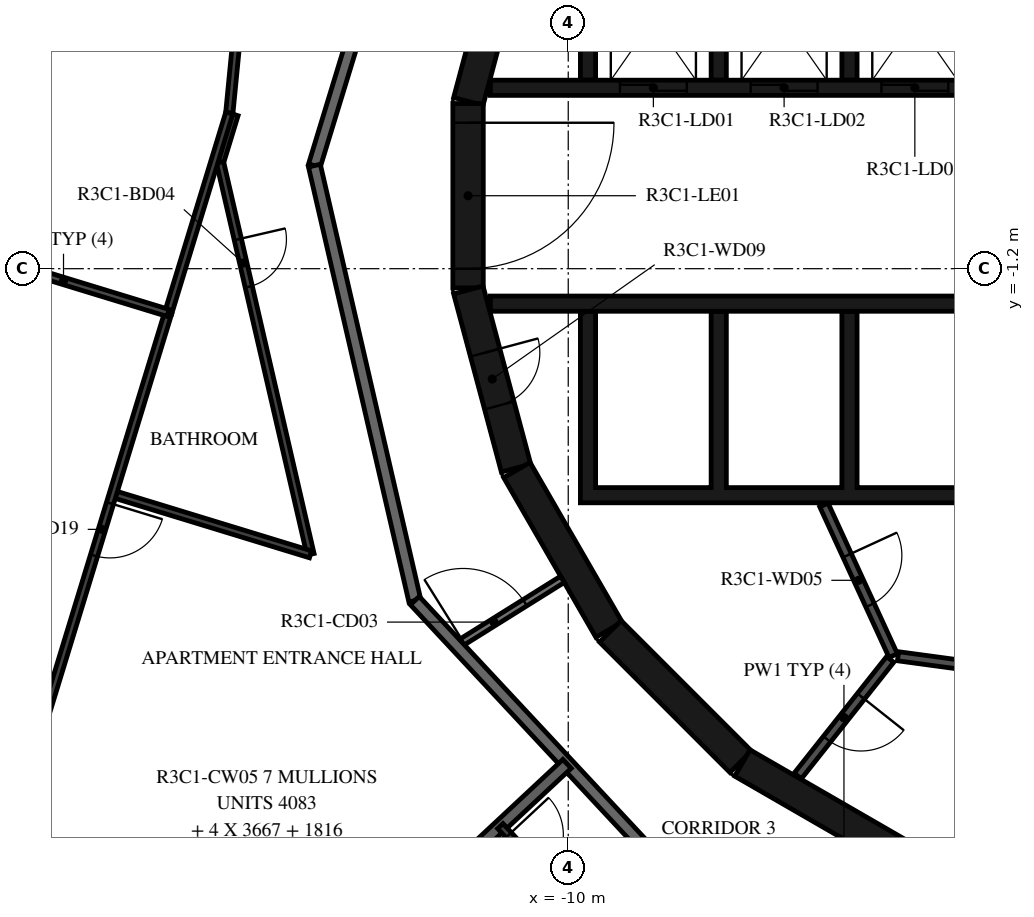
"""IFC4 building model, lengths in metres.
Left out: names, types, materials, properties, quantities, classifications, styles, units other than length and angle.
Written with IfcOpenShell. Run it as: python <this file> out.ifc"""

import sys

from ifc_helpers import new_model, si_unit, direction, frame, frame_2d, origin, place, context, subcontext, project, spatial, polyline, rectangle, outline, extrude, element, fill, save


model = new_model("IFC4")
c1 = context("Model", 3, precision=1e-05, world=origin(), true_north=direction((0.0, 1.0)))
c2 = subcontext(c1, "Body", "Model", "MODEL_VIEW")
j1 = project(units=[si_unit("LENGTHUNIT", "METRE"), si_unit("PLANEANGLEUNIT", "RADIAN")], contexts=[c1])
p1 = place(None, origin())
s1 = spatial("IfcSite", under=j1, at=p1, CompositionType="ELEMENT")
p2 = place(p1, origin())
s2 = spatial("IfcBuilding", under=s1, at=p2, CompositionType="ELEMENT")
p3 = place(p2, frame((0.0, 0.0, 137.9)))
s3 = spatial("IfcBuildingStorey", under=s2, at=p3, CompositionType="ELEMENT", Elevation=137.9)
p4 = place(p3, frame((-10.858, 4.479, 0.0), z_axis=(0.0, 0.0, 1.0), x_axis=(-0.258734743916, -0.965948410781, 0.0)))
e1 = element("IfcWall", 1, at=p4, inside=s3, PredefinedType="SHEAR", context=c2, shape_type="SweptSolid", body=[
    extrude(rectangle(XDim=3.033, YDim=0.5, at=frame_2d((1.516, 0.0))), origin(), (0.0, 0.0, 1.0), 3.12),
])
p5 = place(p3, frame((-11.647, 1.516, 0.0), z_axis=(0.0, 0.0, 1.0), x_axis=(0.0, -1.0, 0.0)))
e2 = element("IfcWall", 2, at=p5, inside=s3, PredefinedType="SHEAR", context=c2, shape_type="SweptSolid", body=[
    extrude(rectangle(XDim=3.033, YDim=0.5, at=frame_2d((1.516, 0.0))), origin(), (0.0, 0.0, 1.0), 3.12),
])
p6 = place(p5, frame((0.316, 0.0, 0.0)))
e3 = element("IfcOpeningElement", 3, at=p6, cuts=e2, PredefinedType="OPENING", context=c2, shape_type="SweptSolid", body=[
    extrude(rectangle(XDim=2.4, YDim=2.1, at=frame_2d((1.2, 1.05))), frame((0.0, 0.26, 0.0), z_axis=(0.0, -1.0, 0.0), x_axis=(1.0, 0.0, 0.0)), (0.0, 0.0, 1.0), 0.52),
])
p7 = place(p3, frame((-11.643, -1.55, 0.0), z_axis=(0.0, 0.0, 1.0), x_axis=(0.258734743916, -0.965948410781, 0.0)))
e4 = element("IfcWall", 4, at=p7, inside=s3, PredefinedType="SHEAR", context=c2, shape_type="SweptSolid", body=[
    extrude(rectangle(XDim=3.033, YDim=0.5, at=frame_2d((1.516, 0.0))), origin(), (0.0, 0.0, 1.0), 3.12),
])
p8 = place(p7, frame((1.066, 0.0, 0.0)))
e5 = element("IfcOpeningElement", 5, at=p8, cuts=e4, PredefinedType="OPENING", context=c2, shape_type="SweptSolid", body=[
    extrude(rectangle(XDim=0.9, YDim=2.1, at=frame_2d((0.45, 1.05))), frame((0.0, 0.26, 0.0), z_axis=(0.0, -1.0, 0.0), x_axis=(1.0, 0.0, 0.0)), (0.0, 0.0, 1.0), 0.52),
])
p9 = place(p3, frame((-10.845, -4.51, 0.0), z_axis=(0.0, 0.0, 1.0), x_axis=(0.500087131594, -0.865975092491, 0.0)))
e6 = element("IfcWall", 6, at=p9, inside=s3, PredefinedType="SHEAR", context=c2, shape_type="SweptSolid", body=[
    extrude(rectangle(XDim=3.033, YDim=0.5, at=frame_2d((1.516, 0.0))), origin(), (0.0, 0.0, 1.0), 3.12),
])
p10 = place(p3, frame((-9.308, -7.164, 0.0), z_axis=(0.0, 0.0, 1.0), x_axis=(0.707106781187, -0.707106781187, 0.0)))
e7 = element("IfcWall", 7, at=p10, inside=s3, PredefinedType="SHEAR", context=c2, shape_type="SweptSolid", body=[
    extrude(rectangle(XDim=3.032, YDim=0.5, at=frame_2d((1.516, 0.0))), origin(), (0.0, 0.0, 1.0), 3.12),
])
p11 = place(p3, frame((-7.137, -9.329, 0.0), z_axis=(0.0, 0.0, 1.0), x_axis=(0.865975092491, -0.500087131594, 0.0)))
e8 = element("IfcWall", 8, at=p11, inside=s3, PredefinedType="SHEAR", context=c2, shape_type="SweptSolid", body=[
    extrude(rectangle(XDim=3.033, YDim=0.5, at=frame_2d((1.516, 0.0))), origin(), (0.0, 0.0, 1.0), 3.12),
])
p12 = place(p3, origin())
e9 = element("IfcWall", 9, at=p12, inside=s3, PredefinedType="SHEAR", context=c2, shape_type="SweptSolid", body=[
    extrude(outline(polyline([(-9.55, 4.8), (-7.65, 4.8), (-7.65, 1.9), (-7.4, 1.9), (-7.4, 4.8), (-5.5, 4.8), (-5.5, 1.9), (-5.25, 1.9), (-5.25, 4.8), (-3.35, 4.8), (-3.35, 1.9), (-3.1, 1.9), (-3.1, 4.8), (-1.2, 4.8), (-1.2, 1.9), (-0.95, 1.9), (-0.95, 4.8), (0.95, 4.8), (0.95, 1.9), (1.2, 1.9), (1.2, 4.8), (3.1, 4.8), (3.1, 1.9), (3.35, 1.9), (3.35, 4.8), (5.25, 4.8), (5.25, 1.9), (5.5, 1.9), (5.5, 4.8), (7.4, 4.8), (7.4, 1.9), (7.65, 1.9), (7.65, 4.8), (9.55, 4.8), (9.55, 1.9), (9.8, 1.9), (9.8, 4.8), (9.8, 5.05), (-9.8, 5.05), (-9.8, 4.8), (-9.8, 1.9), (-9.55, 1.9), (-9.55, 4.8)])), origin(), (0.0, 0.0, 1.0), 3.12),
])
p13 = place(p3, origin())
e10 = element("IfcWall", 10, at=p13, inside=s3, PredefinedType="SHEAR", context=c2, shape_type="SweptSolid", body=[
    extrude(outline(polyline([(9.8, -5.05), (9.8, -4.8), (9.8, -1.9), (9.55, -1.9), (9.55, -4.8), (7.65, -4.8), (7.65, -1.9), (7.4, -1.9), (7.4, -4.8), (5.5, -4.8), (5.5, -1.9), (5.25, -1.9), (5.25, -4.8), (3.35, -4.8), (3.35, -1.9), (3.1, -1.9), (3.1, -4.8), (-5.25, -4.8), (-5.25, -1.9), (-5.5, -1.9), (-5.5, -4.8), (-7.4, -4.8), (-7.4, -1.9), (-7.65, -1.9), (-7.65, -4.8), (-9.55, -4.8), (-9.55, -1.9), (-9.8, -1.9), (-9.8, -4.8), (-9.8, -5.05), (9.8, -5.05)])), origin(), (0.0, 0.0, 1.0), 3.12),
])
p14 = place(p3, frame((-11.28, 1.775, 0.0), z_axis=(0.0, 0.0, 1.0), x_axis=(1.0, 0.0, 0.0)))
e11 = element("IfcWall", 11, at=p14, inside=s3, PredefinedType="SHEAR", context=c2, shape_type="SweptSolid", body=[
    extrude(rectangle(XDim=14.38, YDim=0.25, at=frame_2d((7.19, 0.0))), origin(), (0.0, 0.0, 1.0), 3.12),
])
p15 = place(p14, frame((2.13, 0.0, 0.0)))
e12 = element("IfcOpeningElement", 12, at=p15, cuts=e11, PredefinedType="OPENING", context=c2, shape_type="SweptSolid", body=[
    extrude(rectangle(XDim=1.1, YDim=2.1, at=frame_2d((0.55, 1.05))), frame((0.0, 0.135, 0.0), z_axis=(0.0, -1.0, 0.0), x_axis=(1.0, 0.0, 0.0)), (0.0, 0.0, 1.0), 0.27),
])
p16 = place(p14, frame((4.28, 0.0, 0.0)))
e13 = element("IfcOpeningElement", 13, at=p16, cuts=e11, PredefinedType="OPENING", context=c2, shape_type="SweptSolid", body=[
    extrude(rectangle(XDim=1.1, YDim=2.1, at=frame_2d((0.55, 1.05))), frame((0.0, 0.135, 0.0), z_axis=(0.0, -1.0, 0.0), x_axis=(1.0, 0.0, 0.0)), (0.0, 0.0, 1.0), 0.27),
])
p17 = place(p14, frame((6.43, 0.0, 0.0)))
e14 = element("IfcOpeningElement", 14, at=p17, cuts=e11, PredefinedType="OPENING", context=c2, shape_type="SweptSolid", body=[
    extrude(rectangle(XDim=1.1, YDim=2.1, at=frame_2d((0.55, 1.05))), frame((0.0, 0.135, 0.0), z_axis=(0.0, -1.0, 0.0), x_axis=(1.0, 0.0, 0.0)), (0.0, 0.0, 1.0), 0.27),
])
p18 = place(p14, frame((8.58, 0.0, 0.0)))
e15 = element("IfcOpeningElement", 15, at=p18, cuts=e11, PredefinedType="OPENING", context=c2, shape_type="SweptSolid", body=[
    extrude(rectangle(XDim=1.1, YDim=2.1, at=frame_2d((0.55, 1.05))), frame((0.0, 0.135, 0.0), z_axis=(0.0, -1.0, 0.0), x_axis=(1.0, 0.0, 0.0)), (0.0, 0.0, 1.0), 0.27),
])
p19 = place(p14, frame((10.83, 0.0, 0.0)))
e16 = element("IfcOpeningElement", 16, at=p19, cuts=e11, PredefinedType="OPENING", context=c2, shape_type="SweptSolid", body=[
    extrude(rectangle(XDim=0.9, YDim=2.1, at=frame_2d((0.45, 1.05))), frame((0.0, 0.135, 0.0), z_axis=(0.0, -1.0, 0.0), x_axis=(1.0, 0.0, 0.0)), (0.0, 0.0, 1.0), 0.27),
])
p20 = place(p14, frame((12.98, 0.0, 0.0)))
e17 = element("IfcOpeningElement", 17, at=p20, cuts=e11, PredefinedType="OPENING", context=c2, shape_type="SweptSolid", body=[
    extrude(rectangle(XDim=0.9, YDim=2.1, at=frame_2d((0.45, 1.05))), frame((0.0, 0.135, 0.0), z_axis=(0.0, -1.0, 0.0), x_axis=(1.0, 0.0, 0.0)), (0.0, 0.0, 1.0), 0.27),
])
p21 = place(p3, frame((-11.28, -1.775, 0.0), z_axis=(0.0, 0.0, 1.0), x_axis=(1.0, 0.0, 0.0)))
e18 = element("IfcWall", 18, at=p21, inside=s3, PredefinedType="SHEAR", context=c2, shape_type="SweptSolid", body=[
    extrude(rectangle(XDim=14.38, YDim=0.25, at=frame_2d((7.19, 0.0))), origin(), (0.0, 0.0, 1.0), 3.12),
])
p22 = place(p21, frame((9.755, 0.0, 0.0)))
e19 = element("IfcOpeningElement", 19, at=p22, cuts=e18, PredefinedType="OPENING", context=c2, shape_type="SweptSolid", body=[
    extrude(rectangle(XDim=0.9, YDim=2.1, at=frame_2d((0.45, 1.05))), frame((0.0, 0.135, 0.0), z_axis=(0.0, -1.0, 0.0), x_axis=(1.0, 0.0, 0.0)), (0.0, 0.0, 1.0), 0.27),
])
p23 = place(p3, frame((-5.795, -5.086, 0.0), z_axis=(0.0, 0.0, 1.0), x_axis=(0.417887867606, -0.908498613157, 0.0)))
e20 = element("IfcWall", 20, at=p23, inside=s3, PredefinedType="PARTITIONING", context=c2, shape_type="SweptSolid", body=[
    extrude(rectangle(XDim=2.726, YDim=0.15, at=frame_2d((1.363, 0.0))), origin(), (0.0, 0.0, 1.0), 3.12),
])
p24 = place(p23, frame((0.913, 0.0, 0.0)))
e21 = element("IfcOpeningElement", 21, at=p24, cuts=e20, PredefinedType="OPENING", context=c2, shape_type="SweptSolid", body=[
    extrude(rectangle(XDim=0.9, YDim=2.1, at=frame_2d((0.45, 1.05))), frame((0.0, 0.085, 0.0), z_axis=(0.0, -1.0, 0.0), x_axis=(1.0, 0.0, 0.0)), (0.0, 0.0, 1.0), 0.17),
])
p25 = place(p3, frame((-4.706, -7.625, 0.0), z_axis=(0.0, 0.0, 1.0), x_axis=(-0.621392599334, -0.783499353856, 0.0)))
e22 = element("IfcWall", 22, at=p25, inside=s3, PredefinedType="PARTITIONING", context=c2, shape_type="SweptSolid", body=[
    extrude(rectangle(XDim=2.447, YDim=0.15, at=frame_2d((1.224, 0.0))), origin(), (0.0, 0.0, 1.0), 3.12),
])
p26 = place(p25, frame((0.774, 0.0, 0.0)))
e23 = element("IfcOpeningElement", 23, at=p26, cuts=e22, PredefinedType="OPENING", context=c2, shape_type="SweptSolid", body=[
    extrude(rectangle(XDim=0.9, YDim=2.1, at=frame_2d((0.45, 1.05))), frame((0.0, 0.085, 0.0), z_axis=(0.0, -1.0, 0.0), x_axis=(1.0, 0.0, 0.0)), (0.0, 0.0, 1.0), 0.17),
])
p27 = place(p3, frame((-2.42, -7.865, 0.0), z_axis=(0.0, 0.0, 1.0), x_axis=(-0.990972299108, 0.134066783362, 0.0)))
e24 = element("IfcWall", 24, at=p27, inside=s3, PredefinedType="PARTITIONING", context=c2, shape_type="SweptSolid", body=[
    extrude(rectangle(XDim=2.176, YDim=0.15, at=frame_2d((1.088, 0.0))), origin(), (0.0, 0.0, 1.0), 3.12),
])
p28 = place(p3, frame((-11.836, -7.396, 0.0), z_axis=(0.0, 0.0, 1.0), x_axis=(0.848071831599, 0.529881277692, 0.0)))
e25 = element("IfcWall", 25, at=p28, inside=s3, PredefinedType="PARTITIONING", context=c2, shape_type="SweptSolid", body=[
    extrude(rectangle(XDim=2.052, YDim=0.12, at=frame_2d((1.026, 0.0))), origin(), (0.0, 0.0, 1.0), 3.12),
])
p29 = place(p28, frame((0.125, 0.0, 0.0)))
e26 = element("IfcOpeningElement", 26, at=p29, cuts=e25, PredefinedType="OPENING", context=c2, shape_type="SweptSolid", body=[
    extrude(rectangle(XDim=1.2, YDim=2.1, at=frame_2d((0.6, 1.05))), frame((0.0, 0.07, 0.0), z_axis=(0.0, -1.0, 0.0), x_axis=(1.0, 0.0, 0.0)), (0.0, 0.0, 1.0), 0.14),
])
p30 = place(p3, frame((-12.028, 7.516, 0.0), z_axis=(0.0, 0.0, 1.0), x_axis=(-0.292365533182, -0.956306642771, 0.0)))
e27 = element("IfcWall", 27, at=p30, inside=s3, PredefinedType="STANDARD", context=c2, shape_type="SweptSolid", body=[
    extrude(rectangle(XDim=7.342, YDim=0.2, at=frame_2d((3.671, 0.0))), origin(), (0.0, 0.0, 1.0), 3.12),
])
p31 = place(p30, frame((2.533, 0.0, 0.0)))
e28 = element("IfcOpeningElement", 28, at=p31, cuts=e27, PredefinedType="OPENING", context=c2, shape_type="SweptSolid", body=[
    extrude(rectangle(XDim=1.0, YDim=2.1, at=frame_2d((0.5, 1.05))), frame((0.0, 0.11, 0.0), z_axis=(0.0, -1.0, 0.0), x_axis=(1.0, 0.0, 0.0)), (0.0, 0.0, 1.0), 0.22),
])
p32 = place(p3, frame((-14.175, 0.495, 0.0), z_axis=(0.0, 0.0, 1.0), x_axis=(0.224922649383, -0.974376622151, 0.0)))
e29 = element("IfcWall", 29, at=p32, inside=s3, PredefinedType="STANDARD", context=c2, shape_type="SweptSolid", body=[
    extrude(rectangle(XDim=7.342, YDim=0.2, at=frame_2d((3.671, 0.0))), origin(), (0.0, 0.0, 1.0), 3.12),
])
p33 = place(p3, frame((-12.523, -6.659, 0.0), z_axis=(0.0, 0.0, 1.0), x_axis=(0.682001841105, -0.731350455479, 0.0)))
e30 = element("IfcWall", 30, at=p33, inside=s3, PredefinedType="STANDARD", context=c2, shape_type="SweptSolid", body=[
    extrude(rectangle(XDim=7.342, YDim=0.2, at=frame_2d((3.671, 0.0))), origin(), (0.0, 0.0, 1.0), 3.12),
])
p34 = place(p3, frame((-13.699, -12.774, 0.0), z_axis=(0.0, 0.0, 1.0), x_axis=(0.731353758457, 0.681998299111, 0.0)))
e31 = element("IfcWall", 31, at=p34, inside=s3, PredefinedType="STANDARD", context=c2, shape_type="SweptSolid", body=[
    extrude(rectangle(XDim=5.031, YDim=0.2, at=frame_2d((2.515, 0.0))), origin(), (0.0, 0.0, 1.0), 3.12),
])
p35 = place(p3, frame((-15.138, 5.828, 0.0), z_axis=(0.0, 0.0, 1.0), x_axis=(-0.096967255409, -0.995287572201, 0.0)))
e32 = element("IfcWall", 32, at=p35, inside=s3, PredefinedType="PARTITIONING", context=c2, shape_type="SweptSolid", body=[
    extrude(rectangle(XDim=4.489, YDim=0.12, at=frame_2d((2.245, 0.0))), origin(), (0.0, 0.0, 1.0), 3.12),
])
p36 = place(p35, frame((0.2, 0.0, 0.0)))
e33 = element("IfcOpeningElement", 33, at=p36, cuts=e32, PredefinedType="OPENING", context=c2, shape_type="SweptSolid", body=[
    extrude(rectangle(XDim=0.9, YDim=2.1, at=frame_2d((0.45, 1.05))), frame((0.0, 0.07, 0.0), z_axis=(0.0, -1.0, 0.0), x_axis=(1.0, 0.0, 0.0)), (0.0, 0.0, 1.0), 0.14),
])
p37 = place(p3, frame((-15.487, 1.333, 0.0), z_axis=(0.0, 0.0, 1.0), x_axis=(-0.2923698127, -0.956305334411, 0.0)))
e34 = element("IfcWall", 34, at=p37, inside=s3, PredefinedType="PARTITIONING", context=c2, shape_type="SweptSolid", body=[
    extrude(rectangle(XDim=0.82, YDim=0.12, at=frame_2d((0.41, 0.0))), origin(), (0.0, 0.0, 1.0), 3.12),
])
p38 = place(p3, frame((-15.727, 0.549, 0.0), z_axis=(0.0, 0.0, 1.0), x_axis=(0.224948441297, -0.974370668051, 0.0)))
e35 = element("IfcWall", 35, at=p38, inside=s3, PredefinedType="PARTITIONING", context=c2, shape_type="SweptSolid", body=[
    extrude(rectangle(XDim=6.616, YDim=0.12, at=frame_2d((3.308, 0.0))), origin(), (0.0, 0.0, 1.0), 3.12),
])
p39 = place(p38, frame((1.3, 0.0, 0.0)))
e36 = element("IfcOpeningElement", 36, at=p39, cuts=e35, PredefinedType="OPENING", context=c2, shape_type="SweptSolid", body=[
    extrude(rectangle(XDim=0.8, YDim=2.1, at=frame_2d((0.4, 1.05))), frame((0.0, 0.07, 0.0), z_axis=(0.0, -1.0, 0.0), x_axis=(1.0, 0.0, 0.0)), (0.0, 0.0, 1.0), 0.14),
])
p40 = place(p3, frame((-14.238, -5.897, 0.0), z_axis=(0.0, 0.0, 1.0), x_axis=(-0.956314762513, 0.292338972768, 0.0)))
e37 = element("IfcWall", 37, at=p40, inside=s3, PredefinedType="PARTITIONING", context=c2, shape_type="SweptSolid", body=[
    extrude(rectangle(XDim=3.399, YDim=0.12, at=frame_2d((1.699, 0.0))), origin(), (0.0, 0.0, 1.0), 3.12),
])
p41 = place(p3, frame((-16.579, -1.928, 0.0), z_axis=(0.0, 0.0, 1.0), x_axis=(-0.29236733738, -0.956306091183, 0.0)))
e38 = element("IfcWall", 38, at=p41, inside=s3, PredefinedType="PARTITIONING", context=c2, shape_type="SweptSolid", body=[
    extrude(rectangle(XDim=11.963, YDim=0.12, at=frame_2d((5.981, 0.0))), origin(), (0.0, 0.0, 1.0), 3.12),
])
p42 = place(p41, frame((3.271, 0.0, 0.0)))
e39 = element("IfcOpeningElement", 39, at=p42, cuts=e38, PredefinedType="OPENING", context=c2, shape_type="SweptSolid", body=[
    extrude(rectangle(XDim=0.9, YDim=2.1, at=frame_2d((0.45, 1.05))), frame((0.0, 0.07, 0.0), z_axis=(0.0, -1.0, 0.0), x_axis=(1.0, 0.0, 0.0)), (0.0, 0.0, 1.0), 0.14),
])
p43 = place(p3, frame((-16.579, -1.928, 0.0), z_axis=(0.0, 0.0, 1.0), x_axis=(0.292418780126, 0.956290362301, 0.0)))
e40 = element("IfcWall", 40, at=p43, inside=s3, PredefinedType="PARTITIONING", context=c2, shape_type="SweptSolid", body=[
    extrude(rectangle(XDim=3.438, YDim=0.12, at=frame_2d((1.719, 0.0))), origin(), (0.0, 0.0, 1.0), 3.12),
])
p44 = place(p3, frame((-20.022, -0.875, 0.0), z_axis=(0.0, 0.0, 1.0), x_axis=(0.956306810244, -0.292364985388, 0.0)))
e41 = element("IfcWall", 41, at=p44, inside=s3, PredefinedType="PARTITIONING", context=c2, shape_type="SweptSolid", body=[
    extrude(rectangle(XDim=3.6, YDim=0.12, at=frame_2d((1.8, 0.0))), origin(), (0.0, 0.0, 1.0), 2.73),
])
p45 = place(p3, frame((-11.117, -10.366, 0.0), z_axis=(0.0, 0.0, 1.0), x_axis=(0.682029016154, -0.73132511315, 0.0)))
e42 = element("IfcWall", 42, at=p45, inside=s3, PredefinedType="PARTITIONING", context=c2, shape_type="SweptSolid", body=[
    extrude(rectangle(XDim=2.858, YDim=0.12, at=frame_2d((1.429, 0.0))), origin(), (0.0, 0.0, 1.0), 3.12),
])
p46 = place(p45, frame((0.2, 0.0, 0.0)))
e43 = element("IfcOpeningElement", 43, at=p46, cuts=e42, PredefinedType="OPENING", context=c2, shape_type="SweptSolid", body=[
    extrude(rectangle(XDim=0.9, YDim=2.1, at=frame_2d((0.45, 1.05))), frame((0.0, 0.07, 0.0), z_axis=(0.0, -1.0, 0.0), x_axis=(1.0, 0.0, 0.0)), (0.0, 0.0, 1.0), 0.14),
])
p47 = place(p6, origin())
e44 = element("IfcDoor", 44, at=p47, inside=s3, OperationType="DOUBLE_DOOR_SINGLE_SWING", PredefinedType="DOOR", context=c2, shape_type="SweptSolid", body=[
    extrude(rectangle(XDim=2.4, YDim=2.1, at=frame_2d((1.2, 1.05))), frame((0.0, 0.025, 0.0), z_axis=(0.0, -1.0, 0.0), x_axis=(1.0, 0.0, 0.0)), (0.0, 0.0, 1.0), 0.05),
])
fill(e3, e44)
p48 = place(p15, origin())
e45 = element("IfcDoor", 45, at=p48, inside=s3, OperationType="DOUBLE_DOOR_SLIDING", PredefinedType="DOOR", context=c2, shape_type="SweptSolid", body=[
    extrude(rectangle(XDim=1.1, YDim=2.1, at=frame_2d((0.55, 1.05))), frame((0.0, 0.025, 0.0), z_axis=(0.0, -1.0, 0.0), x_axis=(1.0, 0.0, 0.0)), (0.0, 0.0, 1.0), 0.05),
])
fill(e12, e45)
p49 = place(p16, origin())
e46 = element("IfcDoor", 46, at=p49, inside=s3, OperationType="DOUBLE_DOOR_SLIDING", PredefinedType="DOOR", context=c2, shape_type="SweptSolid", body=[
    extrude(rectangle(XDim=1.1, YDim=2.1, at=frame_2d((0.55, 1.05))), frame((0.0, 0.025, 0.0), z_axis=(0.0, -1.0, 0.0), x_axis=(1.0, 0.0, 0.0)), (0.0, 0.0, 1.0), 0.05),
])
fill(e13, e46)
p50 = place(p17, origin())
e47 = element("IfcDoor", 47, at=p50, inside=s3, OperationType="DOUBLE_DOOR_SLIDING", PredefinedType="DOOR", context=c2, shape_type="SweptSolid", body=[
    extrude(rectangle(XDim=1.1, YDim=2.1, at=frame_2d((0.55, 1.05))), frame((0.0, 0.025, 0.0), z_axis=(0.0, -1.0, 0.0), x_axis=(1.0, 0.0, 0.0)), (0.0, 0.0, 1.0), 0.05),
])
fill(e14, e47)
p51 = place(p24, origin())
e48 = element("IfcDoor", 48, at=p51, inside=s3, OperationType="SINGLE_SWING_RIGHT", PredefinedType="DOOR", context=c2, shape_type="SweptSolid", body=[
    extrude(rectangle(XDim=0.9, YDim=2.1, at=frame_2d((0.45, 1.05))), frame((0.0, 0.025, 0.0), z_axis=(0.0, -1.0, 0.0), x_axis=(1.0, 0.0, 0.0)), (0.0, 0.0, 1.0), 0.05),
])
fill(e21, e48)
p52 = place(p26, origin())
e49 = element("IfcDoor", 49, at=p52, inside=s3, OperationType="SINGLE_SWING_LEFT", PredefinedType="DOOR", context=c2, shape_type="SweptSolid", body=[
    extrude(rectangle(XDim=0.9, YDim=2.1, at=frame_2d((0.45, 1.05))), frame((0.0, 0.025, 0.0), z_axis=(0.0, -1.0, 0.0), x_axis=(1.0, 0.0, 0.0)), (0.0, 0.0, 1.0), 0.05),
])
fill(e23, e49)
p53 = place(p8, origin())
e50 = element("IfcDoor", 50, at=p53, inside=s3, OperationType="SINGLE_SWING_RIGHT", PredefinedType="DOOR", context=c2, shape_type="SweptSolid", body=[
    extrude(rectangle(XDim=0.9, YDim=2.1, at=frame_2d((0.45, 1.05))), frame((0.0, 0.025, 0.0), z_axis=(0.0, -1.0, 0.0), x_axis=(1.0, 0.0, 0.0)), (0.0, 0.0, 1.0), 0.05),
])
fill(e5, e50)
p54 = place(p39, origin())
e51 = element("IfcDoor", 51, at=p54, inside=s3, OperationType="SINGLE_SWING_RIGHT", PredefinedType="DOOR", context=c2, shape_type="SweptSolid", body=[
    extrude(rectangle(XDim=0.8, YDim=2.1, at=frame_2d((0.4, 1.05))), frame((0.0, 0.025, 0.0), z_axis=(0.0, -1.0, 0.0), x_axis=(1.0, 0.0, 0.0)), (0.0, 0.0, 1.0), 0.05),
])
fill(e36, e51)
p55 = place(p42, origin())
e52 = element("IfcDoor", 52, at=p55, inside=s3, OperationType="SINGLE_SWING_RIGHT", PredefinedType="DOOR", context=c2, shape_type="SweptSolid", body=[
    extrude(rectangle(XDim=0.9, YDim=2.1, at=frame_2d((0.45, 1.05))), frame((0.0, 0.025, 0.0), z_axis=(0.0, -1.0, 0.0), x_axis=(1.0, 0.0, 0.0)), (0.0, 0.0, 1.0), 0.05),
])
fill(e39, e52)
p56 = place(p46, origin())
e53 = element("IfcDoor", 53, at=p56, inside=s3, OperationType="SINGLE_SWING_LEFT", PredefinedType="DOOR", context=c2, shape_type="SweptSolid", body=[
    extrude(rectangle(XDim=0.9, YDim=2.1, at=frame_2d((0.45, 1.05))), frame((0.0, 0.025, 0.0), z_axis=(0.0, -1.0, 0.0), x_axis=(1.0, 0.0, 0.0)), (0.0, 0.0, 1.0), 0.05),
])
fill(e43, e53)
p57 = place(p29, origin())
e54 = element("IfcDoor", 54, at=p57, inside=s3, OperationType="DOUBLE_DOOR_SINGLE_SWING", PredefinedType="DOOR", context=c2, shape_type="SweptSolid", body=[
    extrude(rectangle(XDim=1.2, YDim=2.1, at=frame_2d((0.6, 1.05))), frame((0.0, 0.025, 0.0), z_axis=(0.0, -1.0, 0.0), x_axis=(1.0, 0.0, 0.0)), (0.0, 0.0, 1.0), 0.05),
])
fill(e26, e54)
save(model, sys.argv[1])
